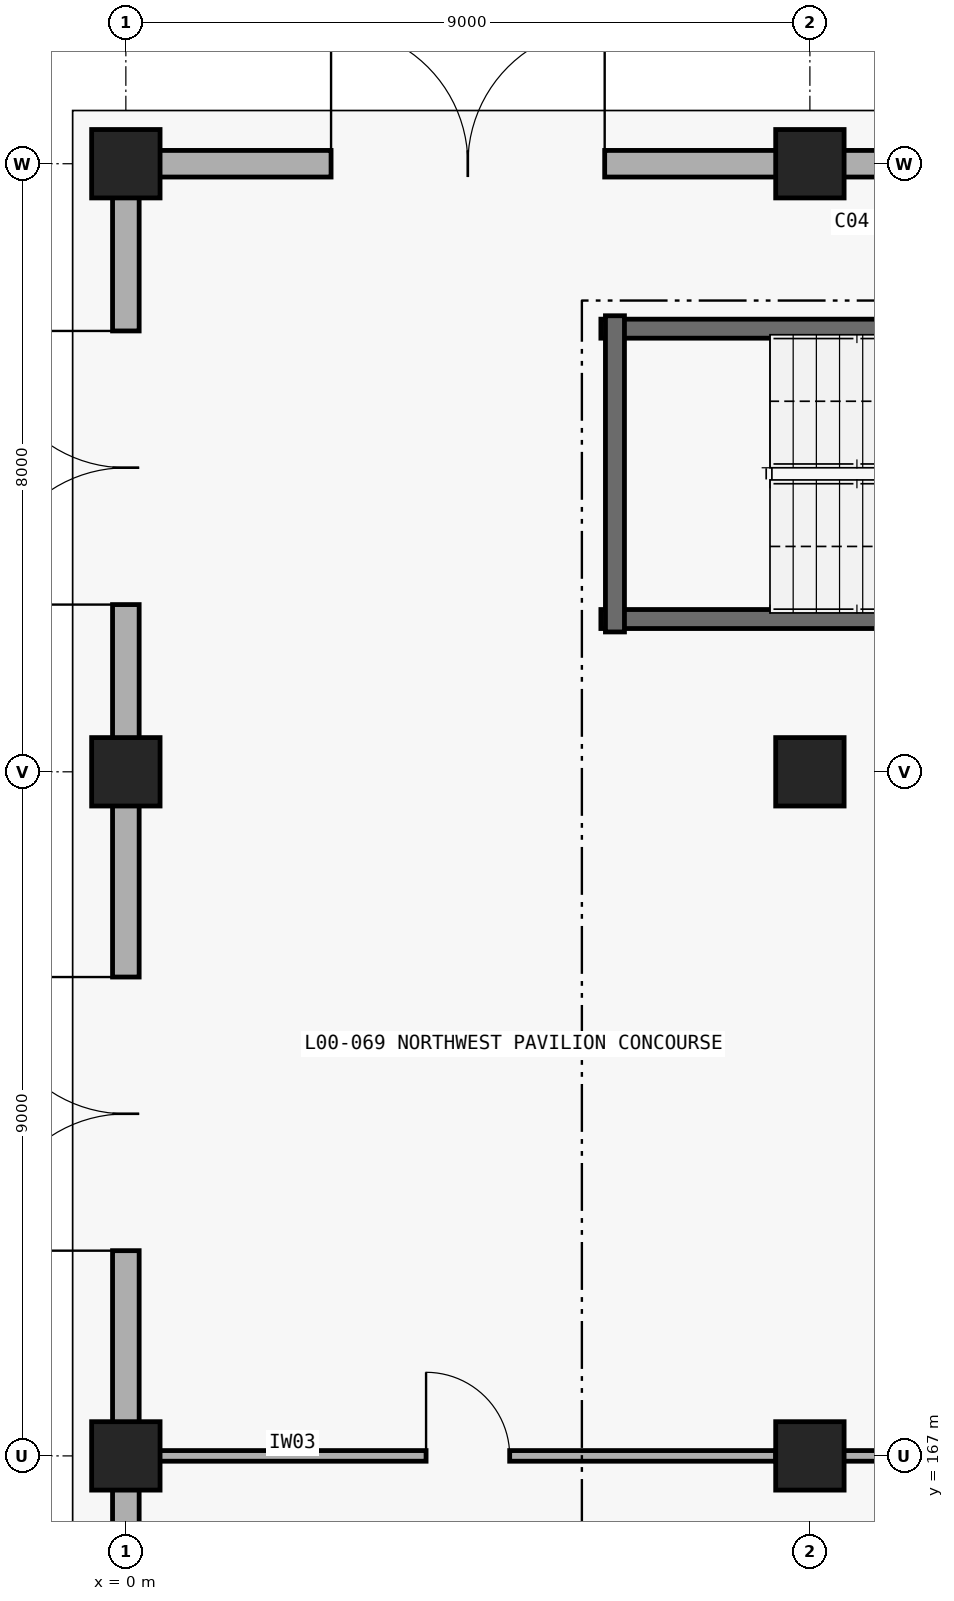
"""IFC4 building model, lengths in metres.
Left out: names, types, materials, properties, quantities, classifications, styles, units other than length and angle.
Written with IfcOpenShell. Run it as: python <this file> out.ifc"""

import sys

from ifc_helpers import new_model, si_unit, direction, frame, frame_2d, origin, origin_2d, place, context, subcontext, project, spatial, rectangle, extrude, element, fill, save


model = new_model("IFC4")
c1 = context("Model", 3, precision=1e-05, world=origin(), true_north=direction((0.0, 1.0)))
c2 = subcontext(c1, "Body", "Model", "MODEL_VIEW")
j1 = project(units=[si_unit("LENGTHUNIT", "METRE"), si_unit("PLANEANGLEUNIT", "RADIAN")], contexts=[c1])
p1 = place(None, origin())
s1 = spatial("IfcSite", under=j1, at=p1, CompositionType="ELEMENT")
p2 = place(p1, origin())
s2 = spatial("IfcBuilding", under=s1, at=p2, CompositionType="ELEMENT")
p3 = place(p2, origin())
s3 = spatial("IfcBuildingStorey", under=s2, at=p3, CompositionType="ELEMENT", Elevation=0.0)
for number, where, z_axis, x_axis in (
    (1, (0.0, 167.0, 0.0), (0.0, 0.0, 1.0), (1.0, 0.0, 0.0)),
    (2, (0.0, 176.0, 0.0), (0.0, 0.0, 1.0), (1.0, 0.0, 0.0)),
    (3, (0.0, 184.0, 0.0), (0.0, 0.0, 1.0), (1.0, 0.0, 0.0)),
    (4, (9.0, 167.0, 0.0), (0.0, 0.0, 1.0), (1.0, 0.0, 0.0)),
    (5, (9.0, 176.0, 0.0), (0.0, 0.0, 1.0), (1.0, 0.0, 0.0)),
    (6, (9.0, 184.0, 0.0), (0.0, 0.0, 1.0), (1.0, 0.0, 0.0)),
):
    element("IfcColumn", number, at=place(p3, frame(where, z_axis=z_axis, x_axis=x_axis)), inside=s3, PredefinedType="COLUMN", context=c2, shape_type="SweptSolid", body=[
        extrude(rectangle(XDim=0.9, YDim=0.9, at=origin_2d()), origin(), (0.0, 0.0, 1.0), 5.4),
    ])
p4 = place(p3, frame((0.0, 158.425, 0.0), z_axis=(0.0, 0.0, 1.0), x_axis=(0.0, 1.0, 0.0)))
e7 = element("IfcWall", 7, at=p4, inside=s3, PredefinedType="STANDARD", context=c2, shape_type="SweptSolid", body=[
    extrude(rectangle(XDim=8.15, YDim=0.35, at=frame_2d((4.075, 0.0))), origin(), (0.0, 0.0, 1.0), 4.417),
])
p5 = place(p4, frame((2.275, 0.0, 0.0)))
e8 = element("IfcOpeningElement", 8, at=p5, cuts=e7, PredefinedType="OPENING", context=c2, shape_type="SweptSolid", body=[
    extrude(rectangle(XDim=3.6, YDim=2.7, at=frame_2d((1.8, 1.35))), frame((0.0, 0.185, 0.0), z_axis=(0.0, -1.0, 0.0), x_axis=(1.0, 0.0, 0.0)), (0.0, 0.0, 1.0), 0.37),
])
p6 = place(p3, frame((0.0, 167.425, 0.0), z_axis=(0.0, 0.0, 1.0), x_axis=(0.0, 1.0, 0.0)))
e9 = element("IfcWall", 9, at=p6, inside=s3, PredefinedType="STANDARD", context=c2, shape_type="SweptSolid", body=[
    extrude(rectangle(XDim=8.15, YDim=0.35, at=frame_2d((4.075, 0.0))), origin(), (0.0, 0.0, 1.0), 4.417),
])
p7 = place(p6, frame((2.275, 0.0, 0.0)))
e10 = element("IfcOpeningElement", 10, at=p7, cuts=e9, PredefinedType="OPENING", context=c2, shape_type="SweptSolid", body=[
    extrude(rectangle(XDim=3.6, YDim=2.7, at=frame_2d((1.8, 1.35))), frame((0.0, 0.185, 0.0), z_axis=(0.0, -1.0, 0.0), x_axis=(1.0, 0.0, 0.0)), (0.0, 0.0, 1.0), 0.37),
])
p8 = place(p3, frame((0.0, 176.425, 0.0), z_axis=(0.0, 0.0, 1.0), x_axis=(0.0, 1.0, 0.0)))
e11 = element("IfcWall", 11, at=p8, inside=s3, PredefinedType="STANDARD", context=c2, shape_type="SweptSolid", body=[
    extrude(rectangle(XDim=7.15, YDim=0.35, at=frame_2d((3.575, 0.0))), origin(), (0.0, 0.0, 1.0), 4.417),
])
p9 = place(p8, frame((1.775, 0.0, 0.0)))
e12 = element("IfcOpeningElement", 12, at=p9, cuts=e11, PredefinedType="OPENING", context=c2, shape_type="SweptSolid", body=[
    extrude(rectangle(XDim=3.6, YDim=2.7, at=frame_2d((1.8, 1.35))), frame((0.0, 0.185, 0.0), z_axis=(0.0, -1.0, 0.0), x_axis=(1.0, 0.0, 0.0)), (0.0, 0.0, 1.0), 0.37),
])
p10 = place(p3, frame((0.425, 184.0, 0.0), z_axis=(0.0, 0.0, 1.0), x_axis=(1.0, 0.0, 0.0)))
e13 = element("IfcWall", 13, at=p10, inside=s3, PredefinedType="STANDARD", context=c2, shape_type="SweptSolid", body=[
    extrude(rectangle(XDim=8.15, YDim=0.35, at=frame_2d((4.075, 0.0))), origin(), (0.0, 0.0, 1.0), 4.384),
])
p11 = place(p10, frame((2.275, 0.0, 0.0)))
e14 = element("IfcOpeningElement", 14, at=p11, cuts=e13, PredefinedType="OPENING", context=c2, shape_type="SweptSolid", body=[
    extrude(rectangle(XDim=3.6, YDim=2.7, at=frame_2d((1.8, 1.35))), frame((0.0, 0.185, 0.0), z_axis=(0.0, -1.0, 0.0), x_axis=(1.0, 0.0, 0.0)), (0.0, 0.0, 1.0), 0.37),
])
p12 = place(p3, frame((9.425, 184.0, 0.0), z_axis=(0.0, 0.0, 1.0), x_axis=(1.0, 0.0, 0.0)))
e15 = element("IfcWall", 15, at=p12, inside=s3, PredefinedType="STANDARD", context=c2, shape_type="SweptSolid", body=[
    extrude(rectangle(XDim=8.15, YDim=0.35, at=frame_2d((4.075, 0.0))), origin(), (0.0, 0.0, 1.0), 4.384),
])
p13 = place(p12, frame((3.85, 0.0, 0.0)))
e16 = element("IfcOpeningElement", 16, at=p13, cuts=e15, PredefinedType="OPENING", context=c2, shape_type="SweptSolid", body=[
    extrude(rectangle(XDim=1.95, YDim=2.25, at=frame_2d((0.975, 1.125))), frame((0.0, 0.185, 0.0), z_axis=(0.0, -1.0, 0.0), x_axis=(1.0, 0.0, 0.0)), (0.0, 0.0, 1.0), 0.37),
])
p14 = place(p3, frame((6.25, 181.83, 0.0), z_axis=(0.0, 0.0, 1.0), x_axis=(1.0, 0.0, 0.0)))
e17 = element("IfcWall", 17, at=p14, inside=s3, PredefinedType="SHEAR", context=c2, shape_type="SweptSolid", body=[
    extrude(rectangle(XDim=9.5, YDim=0.25, at=frame_2d((4.75, 0.0))), origin(), (0.0, 0.0, 1.0), 5.1),
])
p15 = place(p14, frame((7.14, 0.0, 0.0)))
e18 = element("IfcOpeningElement", 18, at=p15, cuts=e17, PredefinedType="OPENING", context=c2, shape_type="SweptSolid", body=[
    extrude(rectangle(XDim=1.85, YDim=2.3, at=frame_2d((0.925, 1.15))), frame((0.0, 0.135, 0.0), z_axis=(0.0, -1.0, 0.0), x_axis=(1.0, 0.0, 0.0)), (0.0, 0.0, 1.0), 0.27),
])
p16 = place(p3, frame((6.25, 178.01, 0.0), z_axis=(0.0, 0.0, 1.0), x_axis=(1.0, 0.0, 0.0)))
e19 = element("IfcWall", 19, at=p16, inside=s3, PredefinedType="SHEAR", context=c2, shape_type="SweptSolid", body=[
    extrude(rectangle(XDim=9.5, YDim=0.25, at=frame_2d((4.75, 0.0))), origin(), (0.0, 0.0, 1.0), 5.1),
])
p17 = place(p3, frame((6.435, 182.0, 0.0), z_axis=(0.0, 0.0, 1.0), x_axis=(0.0, -1.0, 0.0)))
e20 = element("IfcWall", 20, at=p17, inside=s3, PredefinedType="SHEAR", context=c2, shape_type="SweptSolid", body=[
    extrude(rectangle(XDim=4.16, YDim=0.25, at=frame_2d((2.08, 0.0))), origin(), (0.0, 0.0, 1.0), 5.1),
])
p18 = place(p3, frame((0.435, 167.0, 0.0), z_axis=(0.0, 0.0, 1.0), x_axis=(1.0, 0.0, 0.0)))
e21 = element("IfcWall", 21, at=p18, inside=s3, PredefinedType="PARTITIONING", context=c2, shape_type="SweptSolid", body=[
    extrude(rectangle(XDim=8.13, YDim=0.14, at=frame_2d((4.065, 0.0))), origin(), (0.0, 0.0, 1.0), 4.384),
])
p19 = place(p18, frame((3.515, 0.0, 0.0)))
e22 = element("IfcOpeningElement", 22, at=p19, cuts=e21, PredefinedType="OPENING", context=c2, shape_type="SweptSolid", body=[
    extrude(rectangle(XDim=1.1, YDim=2.15, at=frame_2d((0.55, 1.075))), frame((0.0, 0.08, 0.0), z_axis=(0.0, -1.0, 0.0), x_axis=(1.0, 0.0, 0.0)), (0.0, 0.0, 1.0), 0.16),
])
p20 = place(p3, frame((8.55, 167.0, 0.0), z_axis=(0.0, 0.0, 1.0), x_axis=(1.0, 0.0, 0.0)))
e23 = element("IfcWall", 23, at=p20, inside=s3, PredefinedType="PARTITIONING", context=c2, shape_type="SweptSolid", body=[
    extrude(rectangle(XDim=9.015, YDim=0.14, at=frame_2d((4.507, 0.0))), origin(), (0.0, 0.0, 1.0), 4.384),
])
p21 = place(p20, frame((3.908, 0.0, 0.0)))
e24 = element("IfcOpeningElement", 24, at=p21, cuts=e23, PredefinedType="OPENING", context=c2, shape_type="SweptSolid", body=[
    extrude(rectangle(XDim=1.2, YDim=2.25, at=frame_2d((0.6, 1.125))), frame((0.0, 0.08, 0.0), z_axis=(0.0, -1.0, 0.0), x_axis=(1.0, 0.0, 0.0)), (0.0, 0.0, 1.0), 0.16),
])
p22 = place(p7, origin())
e25 = element("IfcDoor", 25, at=p22, inside=s3, OperationType="DOUBLE_DOOR_SINGLE_SWING", PredefinedType="DOOR", context=c2, shape_type="SweptSolid", body=[
    extrude(rectangle(XDim=3.6, YDim=2.7, at=frame_2d((1.8, 1.35))), frame((0.0, 0.025, 0.0), z_axis=(0.0, -1.0, 0.0), x_axis=(1.0, 0.0, 0.0)), (0.0, 0.0, 1.0), 0.05),
])
fill(e10, e25)
p23 = place(p9, origin())
e26 = element("IfcDoor", 26, at=p23, inside=s3, OperationType="DOUBLE_DOOR_SINGLE_SWING", PredefinedType="DOOR", context=c2, shape_type="SweptSolid", body=[
    extrude(rectangle(XDim=3.6, YDim=2.7, at=frame_2d((1.8, 1.35))), frame((0.0, 0.025, 0.0), z_axis=(0.0, -1.0, 0.0), x_axis=(1.0, 0.0, 0.0)), (0.0, 0.0, 1.0), 0.05),
])
fill(e12, e26)
p24 = place(p11, origin())
e27 = element("IfcDoor", 27, at=p24, inside=s3, OperationType="DOUBLE_DOOR_SINGLE_SWING", PredefinedType="DOOR", context=c2, shape_type="SweptSolid", body=[
    extrude(rectangle(XDim=3.6, YDim=2.7, at=frame_2d((1.8, 1.35))), frame((0.0, 0.025, 0.0), z_axis=(0.0, -1.0, 0.0), x_axis=(1.0, 0.0, 0.0)), (0.0, 0.0, 1.0), 0.05),
])
fill(e14, e27)
p25 = place(p19, origin())
e28 = element("IfcDoor", 28, at=p25, inside=s3, OperationType="SINGLE_SWING_LEFT", PredefinedType="DOOR", context=c2, shape_type="SweptSolid", body=[
    extrude(rectangle(XDim=1.1, YDim=2.15, at=frame_2d((0.55, 1.075))), frame((0.0, 0.025, 0.0), z_axis=(0.0, -1.0, 0.0), x_axis=(1.0, 0.0, 0.0)), (0.0, 0.0, 1.0), 0.05),
])
fill(e22, e28)
save(model, sys.argv[1])
